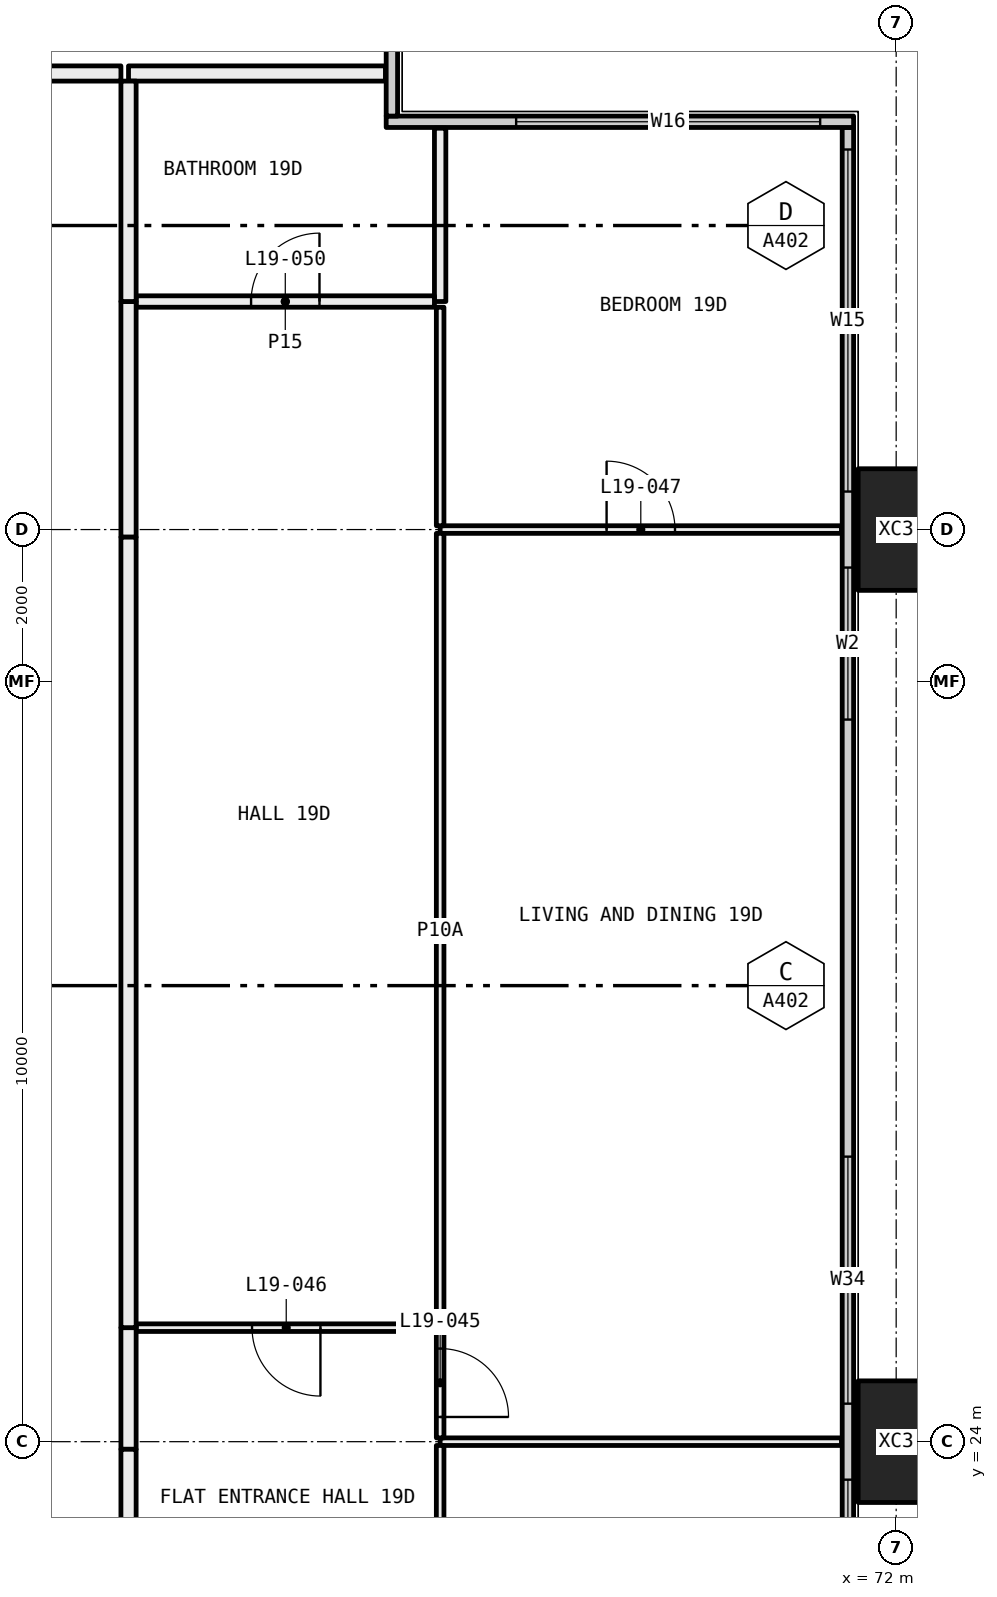
"""IFC4 building model, lengths in metres.
Left out: names, types, materials, properties, quantities, classifications, styles, units other than length and angle.
Written with IfcOpenShell. Run it as: python <this file> out.ifc"""

import sys

from ifc_helpers import new_model, si_unit, direction, frame, frame_2d, origin, origin_2d, place, context, subcontext, project, spatial, rectangle, hollow_rectangle, extrude, element, fill, save


model = new_model("IFC4")
c1 = context("Model", 3, precision=1e-05, world=origin(), true_north=direction((0.0, 1.0)))
c2 = subcontext(c1, "Body", "Model", "MODEL_VIEW")
j1 = project(units=[si_unit("LENGTHUNIT", "METRE"), si_unit("PLANEANGLEUNIT", "RADIAN")], contexts=[c1])
p1 = place(None, origin())
s1 = spatial("IfcSite", under=j1, at=p1, CompositionType="ELEMENT")
p2 = place(p1, origin())
s2 = spatial("IfcBuilding", under=s1, at=p2, CompositionType="ELEMENT")
p3 = place(p2, frame((0.0, 0.0, 78.3)))
s3 = spatial("IfcBuildingStorey", under=s2, at=p3, CompositionType="ELEMENT", Elevation=78.3)
for number, where, z_axis, x_axis in (
    (1, (72.0, 24.0, -0.4), (0.0, 0.0, 1.0), (0.0, 1.0, 0.0)),
    (2, (72.0, 36.0, -0.4), (0.0, 0.0, 1.0), (0.0, 1.0, 0.0)),
):
    element("IfcColumn", number, at=place(p3, frame(where, z_axis=z_axis, x_axis=x_axis)), inside=s3, PredefinedType="COLUMN", context=c2, shape_type="SweptSolid", body=[
        extrude(hollow_rectangle(XDim=1.6, YDim=1.0, WallThickness=0.065, at=origin_2d()), origin(), (0.0, 0.0, 1.0), 3.45),
    ])
p4 = place(p3, frame((71.365, 6.71, 0.0), z_axis=(0.0, 0.0, 1.0), x_axis=(0.0, 1.0, 0.0)))
e3 = element("IfcWall", 3, at=p4, inside=s3, PredefinedType="ELEMENTEDWALL", context=c2, shape_type="SweptSolid", body=[
    extrude(rectangle(XDim=34.58, YDim=0.15, at=frame_2d((17.29, 0.0))), origin(), (0.0, 0.0, 1.0), 3.05),
])
p5 = place(p4, frame((0.29, 0.0, 0.45)))
e4 = element("IfcOpeningElement", 4, at=p5, cuts=e3, PredefinedType="OPENING", context=c2, shape_type="SweptSolid", body=[
    extrude(rectangle(XDim=4.5, YDim=2.55, at=frame_2d((2.25, 1.275))), frame((0.0, 0.085, 0.0), z_axis=(0.0, -1.0, 0.0), x_axis=(1.0, 0.0, 0.0)), (0.0, 0.0, 1.0), 0.17),
])
p6 = place(p4, frame((5.79, 0.0, 0.45)))
e5 = element("IfcOpeningElement", 5, at=p6, cuts=e3, PredefinedType="OPENING", context=c2, shape_type="SweptSolid", body=[
    extrude(rectangle(XDim=3.25, YDim=2.55, at=frame_2d((1.625, 1.275))), frame((0.0, 0.085, 0.0), z_axis=(0.0, -1.0, 0.0), x_axis=(1.0, 0.0, 0.0)), (0.0, 0.0, 1.0), 0.17),
])
p7 = place(p4, frame((13.54, 0.0, 0.45)))
e6 = element("IfcOpeningElement", 6, at=p7, cuts=e3, PredefinedType="OPENING", context=c2, shape_type="SweptSolid", body=[
    extrude(rectangle(XDim=3.25, YDim=2.55, at=frame_2d((1.625, 1.275))), frame((0.0, 0.085, 0.0), z_axis=(0.0, -1.0, 0.0), x_axis=(1.0, 0.0, 0.0)), (0.0, 0.0, 1.0), 0.17),
])
p8 = place(p4, frame((17.79, 0.0, 0.45)))
e7 = element("IfcOpeningElement", 7, at=p8, cuts=e3, PredefinedType="OPENING", context=c2, shape_type="SweptSolid", body=[
    extrude(rectangle(XDim=3.25, YDim=2.55, at=frame_2d((1.625, 1.275))), frame((0.0, 0.085, 0.0), z_axis=(0.0, -1.0, 0.0), x_axis=(1.0, 0.0, 0.0)), (0.0, 0.0, 1.0), 0.17),
])
p9 = place(p4, frame((26.79, 0.0, 0.45)))
e8 = element("IfcOpeningElement", 8, at=p9, cuts=e3, PredefinedType="OPENING", context=c2, shape_type="SweptSolid", body=[
    extrude(rectangle(XDim=2.0, YDim=2.55, at=frame_2d((1.0, 1.275))), frame((0.0, 0.085, 0.0), z_axis=(0.0, -1.0, 0.0), x_axis=(1.0, 0.0, 0.0)), (0.0, 0.0, 1.0), 0.17),
])
p10 = place(p4, frame((29.79, 0.0, 0.45)))
e9 = element("IfcOpeningElement", 9, at=p10, cuts=e3, PredefinedType="OPENING", context=c2, shape_type="SweptSolid", body=[
    extrude(rectangle(XDim=4.5, YDim=2.55, at=frame_2d((2.25, 1.275))), frame((0.0, 0.085, 0.0), z_axis=(0.0, -1.0, 0.0), x_axis=(1.0, 0.0, 0.0)), (0.0, 0.0, 1.0), 0.17),
])
p11 = place(p3, frame((65.29, 41.365, 0.0), z_axis=(0.0, 0.0, 1.0), x_axis=(1.0, 0.0, 0.0)))
e10 = element("IfcWall", 10, at=p11, inside=s3, PredefinedType="ELEMENTEDWALL", context=c2, shape_type="SweptSolid", body=[
    extrude(rectangle(XDim=6.15, YDim=0.15, at=frame_2d((3.075, 0.0))), origin(), (0.0, 0.0, 1.0), 3.05),
])
p12 = place(p11, frame((1.71, 0.0, 0.45)))
e11 = element("IfcOpeningElement", 11, at=p12, cuts=e10, PredefinedType="OPENING", context=c2, shape_type="SweptSolid", body=[
    extrude(rectangle(XDim=4.0, YDim=2.55, at=frame_2d((2.0, 1.275))), frame((0.0, 0.085, 0.0), z_axis=(0.0, -1.0, 0.0), x_axis=(1.0, 0.0, 0.0)), (0.0, 0.0, 1.0), 0.17),
])
p13 = place(p3, frame((65.365, 41.44, 0.0), z_axis=(0.0, 0.0, 1.0), x_axis=(0.0, 1.0, 0.0)))
e12 = element("IfcWall", 12, at=p13, inside=s3, PredefinedType="ELEMENTEDWALL", context=c2, shape_type="SweptSolid", body=[
    extrude(rectangle(XDim=5.85, YDim=0.15, at=frame_2d((2.925, 0.0))), origin(), (0.0, 0.0, 1.0), 3.05),
])
p14 = place(p13, frame((1.56, 0.0, 0.45)))
e13 = element("IfcOpeningElement", 13, at=p14, cuts=e12, PredefinedType="OPENING", context=c2, shape_type="SweptSolid", body=[
    extrude(rectangle(XDim=4.0, YDim=2.55, at=frame_2d((2.0, 1.275))), frame((0.0, 0.085, 0.0), z_axis=(0.0, -1.0, 0.0), x_axis=(1.0, 0.0, 0.0)), (0.0, 0.0, 1.0), 0.17),
])
p15 = place(p3, frame((71.28, 24.0, 0.0), z_axis=(0.0, 0.0, 1.0), x_axis=(-1.0, 0.0, 0.0)))
e14 = element("IfcWall", 14, at=p15, inside=s3, PredefinedType="PARTITIONING", context=c2, shape_type="SweptSolid", body=[
    extrude(rectangle(XDim=5.28, YDim=0.1, at=frame_2d((2.64, 0.0))), origin(), (0.0, 0.0, 1.0), 2.45),
])
p16 = place(p3, frame((66.0, 23.95, 0.0), z_axis=(0.0, 0.0, 1.0), x_axis=(0.0, -1.0, 0.0)))
e15 = element("IfcWall", 15, at=p16, inside=s3, PredefinedType="PARTITIONING", context=c2, shape_type="SweptSolid", body=[
    extrude(rectangle(XDim=2.875, YDim=0.1, at=frame_2d((1.438, 0.0))), origin(), (0.0, 0.0, 1.0), 2.45),
])
p17 = place(p16, frame((0.988, 0.0, 0.0)))
e16 = element("IfcOpeningElement", 16, at=p17, cuts=e15, PredefinedType="OPENING", context=c2, shape_type="SweptSolid", body=[
    extrude(rectangle(XDim=0.9, YDim=2.1, at=frame_2d((0.45, 1.05))), frame((0.0, 0.06, 0.0), z_axis=(0.0, -1.0, 0.0), x_axis=(1.0, 0.0, 0.0)), (0.0, 0.0, 1.0), 0.12),
])
p18 = place(p3, frame((71.28, 36.0, 0.0), z_axis=(0.0, 0.0, 1.0), x_axis=(-1.0, 0.0, 0.0)))
e17 = element("IfcWall", 17, at=p18, inside=s3, PredefinedType="PARTITIONING", context=c2, shape_type="SweptSolid", body=[
    extrude(rectangle(XDim=5.28, YDim=0.1, at=frame_2d((2.64, 0.0))), origin(), (0.0, 0.0, 1.0), 2.45),
])
p19 = place(p18, frame((2.19, 0.0, 0.0)))
e18 = element("IfcOpeningElement", 18, at=p19, cuts=e17, PredefinedType="OPENING", context=c2, shape_type="SweptSolid", body=[
    extrude(rectangle(XDim=0.9, YDim=2.1, at=frame_2d((0.45, 1.05))), frame((0.0, 0.06, 0.0), z_axis=(0.0, -1.0, 0.0), x_axis=(1.0, 0.0, 0.0)), (0.0, 0.0, 1.0), 0.12),
])
p20 = place(p3, frame((66.0, 25.5, 0.0), z_axis=(0.0, 0.0, 1.0), x_axis=(0.0, -1.0, 0.0)))
e19 = element("IfcWall", 19, at=p20, inside=s3, PredefinedType="PARTITIONING", context=c2, shape_type="SweptSolid", body=[
    extrude(rectangle(XDim=1.45, YDim=0.1, at=frame_2d((0.725, 0.0))), origin(), (0.0, 0.0, 1.0), 2.45),
])
p21 = place(p20, frame((0.275, 0.0, 0.0)))
e20 = element("IfcOpeningElement", 20, at=p21, cuts=e19, PredefinedType="OPENING", context=c2, shape_type="SweptSolid", body=[
    extrude(rectangle(XDim=0.9, YDim=2.1, at=frame_2d((0.45, 1.05))), frame((0.0, 0.06, 0.0), z_axis=(0.0, -1.0, 0.0), x_axis=(1.0, 0.0, 0.0)), (0.0, 0.0, 1.0), 0.12),
])
p22 = place(p3, frame((66.0, 35.95, 0.0), z_axis=(0.0, 0.0, 1.0), x_axis=(0.0, -1.0, 0.0)))
e21 = element("IfcWall", 21, at=p22, inside=s3, PredefinedType="PARTITIONING", context=c2, shape_type="SweptSolid", body=[
    extrude(rectangle(XDim=10.45, YDim=0.1, at=frame_2d((5.225, 0.0))), origin(), (0.0, 0.0, 1.0), 2.45),
])
p23 = place(p3, frame((66.0, 38.925, 0.0), z_axis=(0.0, 0.0, 1.0), x_axis=(0.0, -1.0, 0.0)))
e22 = element("IfcWall", 22, at=p23, inside=s3, PredefinedType="PARTITIONING", context=c2, shape_type="SweptSolid", body=[
    extrude(rectangle(XDim=2.875, YDim=0.1, at=frame_2d((1.438, 0.0))), origin(), (0.0, 0.0, 1.0), 2.45),
])
p24 = place(p3, frame((66.0, 41.28, 0.0), z_axis=(0.0, 0.0, 1.0), x_axis=(0.0, -1.0, 0.0)))
e23 = element("IfcWall", 23, at=p24, inside=s3, PredefinedType="PARTITIONING", context=c2, shape_type="SweptSolid", body=[
    extrude(rectangle(XDim=2.28, YDim=0.15, at=frame_2d((1.14, 0.0))), origin(), (0.0, 0.0, 1.0), 3.05),
])
p25 = place(p3, frame((65.95, 25.5, 0.0), z_axis=(0.0, 0.0, 1.0), x_axis=(-1.0, 0.0, 0.0)))
e24 = element("IfcWall", 24, at=p25, inside=s3, PredefinedType="PARTITIONING", context=c2, shape_type="SweptSolid", body=[
    extrude(rectangle(XDim=3.95, YDim=0.1, at=frame_2d((1.975, 0.0))), origin(), (0.0, 0.0, 1.0), 3.05),
])
p26 = place(p25, frame((1.525, 0.0, 0.0)))
e25 = element("IfcOpeningElement", 25, at=p26, cuts=e24, PredefinedType="OPENING", context=c2, shape_type="SweptSolid", body=[
    extrude(rectangle(XDim=0.9, YDim=2.1, at=frame_2d((0.45, 1.05))), frame((0.0, 0.06, 0.0), z_axis=(0.0, -1.0, 0.0), x_axis=(1.0, 0.0, 0.0)), (0.0, 0.0, 1.0), 0.12),
])
p27 = place(p3, frame((61.9, 25.5, 0.0), z_axis=(0.0, 0.0, 1.0), x_axis=(0.0, -1.0, 0.0)))
e26 = element("IfcWall", 26, at=p27, inside=s3, PredefinedType="PARTITIONING", context=c2, shape_type="SweptSolid", body=[
    extrude(rectangle(XDim=1.6, YDim=0.2, at=frame_2d((0.8, 0.0))), origin(), (0.0, 0.0, 1.0), 2.45),
])
p28 = place(p3, frame((61.9, 23.9, 0.0), z_axis=(0.0, 0.0, 1.0), x_axis=(0.0, -1.0, 0.0)))
e27 = element("IfcWall", 27, at=p28, inside=s3, PredefinedType="PARTITIONING", context=c2, shape_type="SweptSolid", body=[
    extrude(rectangle(XDim=2.9, YDim=0.2, at=frame_2d((1.45, 0.0))), origin(), (0.0, 0.0, 1.0), 3.05),
])
p29 = place(p28, frame((0.95, 0.0, 0.0)))
e28 = element("IfcOpeningElement", 28, at=p29, cuts=e27, PredefinedType="OPENING", context=c2, shape_type="SweptSolid", body=[
    extrude(rectangle(XDim=1.0, YDim=2.1, at=frame_2d((0.5, 1.05))), frame((0.0, 0.11, 0.0), z_axis=(0.0, -1.0, 0.0), x_axis=(1.0, 0.0, 0.0)), (0.0, 0.0, 1.0), 0.22),
])
p30 = place(p3, frame((65.925, 39.0, 0.0), z_axis=(0.0, 0.0, 1.0), x_axis=(-1.0, 0.0, 0.0)))
e29 = element("IfcWall", 29, at=p30, inside=s3, PredefinedType="PARTITIONING", context=c2, shape_type="SweptSolid", body=[
    extrude(rectangle(XDim=3.925, YDim=0.15, at=frame_2d((1.962, 0.0))), origin(), (0.0, 0.0, 1.0), 3.05),
])
p31 = place(p30, frame((1.512, 0.0, 0.0)))
e30 = element("IfcOpeningElement", 30, at=p31, cuts=e29, PredefinedType="OPENING", context=c2, shape_type="SweptSolid", body=[
    extrude(rectangle(XDim=0.9, YDim=2.1, at=frame_2d((0.45, 1.05))), frame((0.0, 0.085, 0.0), z_axis=(0.0, -1.0, 0.0), x_axis=(1.0, 0.0, 0.0)), (0.0, 0.0, 1.0), 0.17),
])
p32 = place(p3, frame((61.9, 39.0, 0.0), z_axis=(0.0, 0.0, 1.0), x_axis=(0.0, -1.0, 0.0)))
e31 = element("IfcWall", 31, at=p32, inside=s3, PredefinedType="PARTITIONING", context=c2, shape_type="SweptSolid", body=[
    extrude(rectangle(XDim=3.1, YDim=0.2, at=frame_2d((1.55, 0.0))), origin(), (0.0, 0.0, 1.0), 2.45),
])
p33 = place(p3, frame((61.9, 35.9, 0.0), z_axis=(0.0, 0.0, 1.0), x_axis=(0.0, -1.0, 0.0)))
e32 = element("IfcWall", 32, at=p33, inside=s3, PredefinedType="PARTITIONING", context=c2, shape_type="SweptSolid", body=[
    extrude(rectangle(XDim=10.4, YDim=0.2, at=frame_2d((5.2, 0.0))), origin(), (0.0, 0.0, 1.0), 3.05),
])
p34 = place(p3, frame((65.28, 42.0, 0.0), z_axis=(0.0, 0.0, 1.0), x_axis=(-1.0, 0.0, 0.0)))
e33 = element("IfcWall", 33, at=p34, inside=s3, PredefinedType="PARTITIONING", context=c2, shape_type="SweptSolid", body=[
    extrude(rectangle(XDim=3.38, YDim=0.2, at=frame_2d((1.69, 0.0))), origin(), (0.0, 0.0, 1.0), 3.05),
])
p35 = place(p3, frame((61.9, 41.9, 0.0), z_axis=(0.0, 0.0, 1.0), x_axis=(0.0, -1.0, 0.0)))
e34 = element("IfcWall", 34, at=p35, inside=s3, PredefinedType="PARTITIONING", context=c2, shape_type="SweptSolid", body=[
    extrude(rectangle(XDim=2.9, YDim=0.2, at=frame_2d((1.45, 0.0))), origin(), (0.0, 0.0, 1.0), 3.05),
])
p36 = place(p3, frame((60.0, 42.0, 0.0), z_axis=(0.0, 0.0, 1.0), x_axis=(1.0, 0.0, 0.0)))
e35 = element("IfcWall", 35, at=p36, inside=s3, PredefinedType="PARTITIONING", context=c2, shape_type="SweptSolid", body=[
    extrude(rectangle(XDim=1.8, YDim=0.2, at=frame_2d((0.9, 0.0))), origin(), (0.0, 0.0, 1.0), 3.05),
])
p37 = place(p7, origin())
e36 = element("IfcWindow", 36, at=p37, inside=s3, PartitioningType="SINGLE_PANEL", PredefinedType="WINDOW", context=c2, shape_type="SweptSolid", body=[
    extrude(rectangle(XDim=3.25, YDim=2.55, at=frame_2d((1.625, 1.275))), frame((0.0, 0.03, 0.0), z_axis=(0.0, -1.0, 0.0), x_axis=(1.0, 0.0, 0.0)), (0.0, 0.0, 1.0), 0.06),
])
fill(e6, e36)
p38 = place(p8, origin())
e37 = element("IfcWindow", 37, at=p38, inside=s3, PartitioningType="SINGLE_PANEL", PredefinedType="WINDOW", context=c2, shape_type="SweptSolid", body=[
    extrude(rectangle(XDim=3.25, YDim=2.55, at=frame_2d((1.625, 1.275))), frame((0.0, 0.03, 0.0), z_axis=(0.0, -1.0, 0.0), x_axis=(1.0, 0.0, 0.0)), (0.0, 0.0, 1.0), 0.06),
])
fill(e7, e37)
p39 = place(p9, origin())
e38 = element("IfcWindow", 38, at=p39, inside=s3, PartitioningType="SINGLE_PANEL", PredefinedType="WINDOW", context=c2, shape_type="SweptSolid", body=[
    extrude(rectangle(XDim=2.0, YDim=2.55, at=frame_2d((1.0, 1.275))), frame((0.0, 0.03, 0.0), z_axis=(0.0, -1.0, 0.0), x_axis=(1.0, 0.0, 0.0)), (0.0, 0.0, 1.0), 0.06),
])
fill(e8, e38)
p40 = place(p10, origin())
e39 = element("IfcWindow", 39, at=p40, inside=s3, PartitioningType="SINGLE_PANEL", PredefinedType="WINDOW", context=c2, shape_type="SweptSolid", body=[
    extrude(rectangle(XDim=4.5, YDim=2.55, at=frame_2d((2.25, 1.275))), frame((0.0, 0.03, 0.0), z_axis=(0.0, -1.0, 0.0), x_axis=(1.0, 0.0, 0.0)), (0.0, 0.0, 1.0), 0.06),
])
fill(e9, e39)
p41 = place(p12, origin())
e40 = element("IfcWindow", 40, at=p41, inside=s3, PartitioningType="SINGLE_PANEL", PredefinedType="WINDOW", context=c2, shape_type="SweptSolid", body=[
    extrude(rectangle(XDim=4.0, YDim=2.55, at=frame_2d((2.0, 1.275))), frame((0.0, 0.03, 0.0), z_axis=(0.0, -1.0, 0.0), x_axis=(1.0, 0.0, 0.0)), (0.0, 0.0, 1.0), 0.06),
])
fill(e11, e40)
p42 = place(p21, origin())
e41 = element("IfcDoor", 41, at=p42, inside=s3, OperationType="SINGLE_SWING_LEFT", PredefinedType="DOOR", context=c2, shape_type="SweptSolid", body=[
    extrude(rectangle(XDim=0.9, YDim=2.1, at=frame_2d((0.45, 1.05))), frame((0.0, 0.025, 0.0), z_axis=(0.0, -1.0, 0.0), x_axis=(1.0, 0.0, 0.0)), (0.0, 0.0, 1.0), 0.05),
])
fill(e20, e41)
p43 = place(p26, origin())
e42 = element("IfcDoor", 42, at=p43, inside=s3, OperationType="SINGLE_SWING_RIGHT", PredefinedType="DOOR", context=c2, shape_type="SweptSolid", body=[
    extrude(rectangle(XDim=0.9, YDim=2.1, at=frame_2d((0.45, 1.05))), frame((0.0, 0.025, 0.0), z_axis=(0.0, -1.0, 0.0), x_axis=(1.0, 0.0, 0.0)), (0.0, 0.0, 1.0), 0.05),
])
fill(e25, e42)
p44 = place(p19, frame((0.9, 0.0, 0.0), x_axis=(-1.0, 0.0, 0.0)))
e43 = element("IfcDoor", 43, at=p44, inside=s3, OperationType="SINGLE_SWING_RIGHT", PredefinedType="DOOR", context=c2, shape_type="SweptSolid", body=[
    extrude(rectangle(XDim=0.9, YDim=2.1, at=frame_2d((0.45, 1.05))), frame((0.0, 0.025, 0.0), z_axis=(0.0, -1.0, 0.0), x_axis=(1.0, 0.0, 0.0)), (0.0, 0.0, 1.0), 0.05),
])
fill(e18, e43)
p45 = place(p31, frame((0.9, 0.0, 0.0), x_axis=(-1.0, 0.0, 0.0)))
e44 = element("IfcDoor", 44, at=p45, inside=s3, OperationType="SINGLE_SWING_LEFT", PredefinedType="DOOR", context=c2, shape_type="SweptSolid", body=[
    extrude(rectangle(XDim=0.9, YDim=2.1, at=frame_2d((0.45, 1.05))), frame((0.0, 0.025, 0.0), z_axis=(0.0, -1.0, 0.0), x_axis=(1.0, 0.0, 0.0)), (0.0, 0.0, 1.0), 0.05),
])
fill(e30, e44)
save(model, sys.argv[1])
